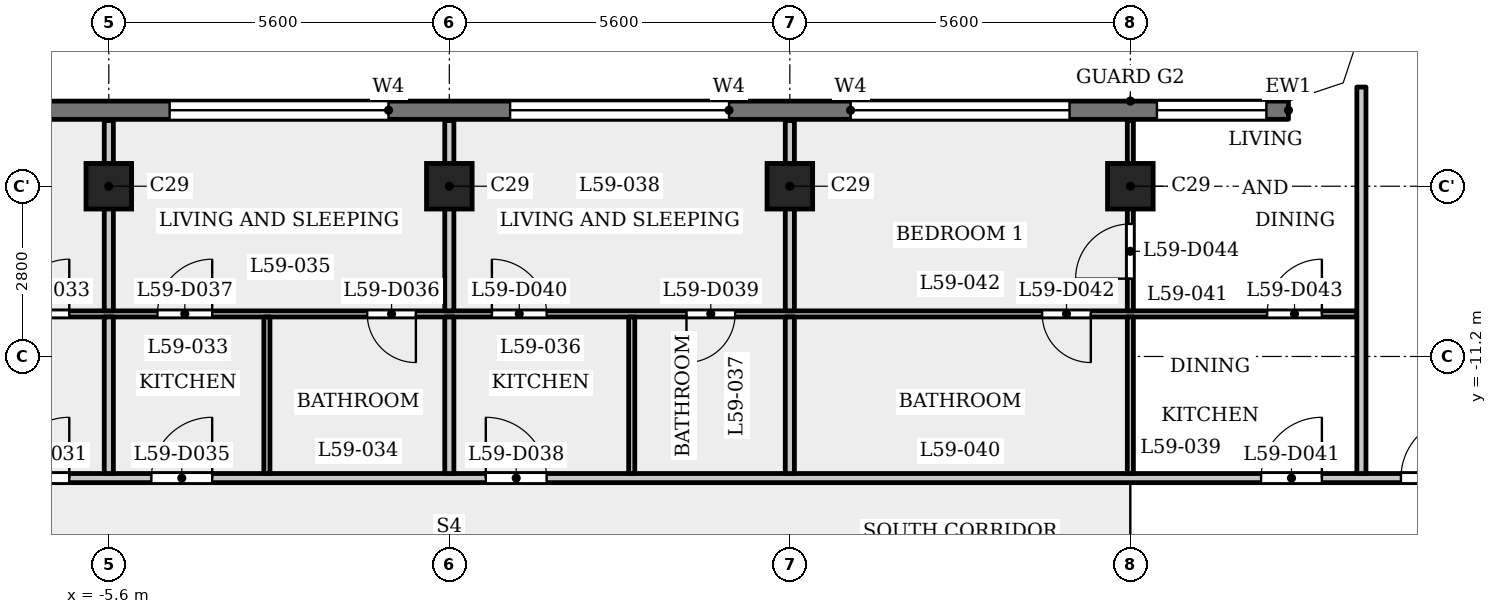
"""IFC4 building model, lengths in metres.
Left out: names, types, materials, properties, quantities, classifications, styles, units other than length and angle.
Written with IfcOpenShell. Run it as: python <this file> out.ifc"""

import sys

from ifc_helpers import new_model, si_unit, direction, frame, frame_2d, origin, origin_2d, place, context, subcontext, project, spatial, polyline, rectangle, outline, extrude, element, fill, save


model = new_model("IFC4")
c1 = context("Model", 3, precision=1e-05, world=origin(), true_north=direction((0.0, 1.0)))
c2 = subcontext(c1, "Body", "Model", "MODEL_VIEW")
j1 = project(units=[si_unit("LENGTHUNIT", "METRE"), si_unit("PLANEANGLEUNIT", "RADIAN")], contexts=[c1])
p1 = place(None, origin())
s1 = spatial("IfcSite", under=j1, at=p1, CompositionType="ELEMENT")
p2 = place(p1, origin())
s2 = spatial("IfcBuilding", under=s1, at=p2, CompositionType="ELEMENT")
p3 = place(p2, frame((0.0, 0.0, 227.4)))
s3 = spatial("IfcBuildingStorey", under=s2, at=p3, CompositionType="ELEMENT", Elevation=227.4)
for number, where, z_axis, x_axis in (
    (1, (-5.6, -8.4, 0.0), (0.0, 0.0, 1.0), (1.0, 0.0, 0.0)),
    (2, (0.0, -8.4, 0.0), (0.0, 0.0, 1.0), (1.0, 0.0, 0.0)),
    (3, (5.6, -8.4, 0.0), (0.0, 0.0, 1.0), (1.0, 0.0, 0.0)),
    (4, (11.2, -8.4, 0.0), (0.0, 0.0, 1.0), (1.0, 0.0, 0.0)),
):
    element("IfcColumn", number, at=place(p3, frame(where, z_axis=z_axis, x_axis=x_axis)), inside=s3, PredefinedType="COLUMN", context=c2, shape_type="SweptSolid", body=[
        extrude(rectangle(XDim=0.75, YDim=0.75, at=origin_2d()), origin(), (0.0, 0.0, 1.0), 3.5),
    ])
p4 = place(p3, frame((13.8, -7.15, 0.0), z_axis=(0.0, 0.0, 1.0), x_axis=(-1.0, 0.0, 0.0)))
e5 = element("IfcWall", 5, at=p4, inside=s3, PredefinedType="SOLIDWALL", context=c2, shape_type="SweptSolid", body=[
    extrude(rectangle(XDim=27.6, YDim=0.3, at=frame_2d((13.8, 0.0))), origin(), (0.0, 0.0, 1.0), 3.15),
])
p5 = place(p4, frame((0.363, 0.0, 0.9)))
e6 = element("IfcOpeningElement", 6, at=p5, cuts=e5, PredefinedType="OPENING", context=c2, shape_type="SweptSolid", body=[
    extrude(rectangle(XDim=1.8, YDim=1.25, at=frame_2d((0.9, 0.625))), frame((0.0, 0.16, 0.0), z_axis=(0.0, -1.0, 0.0), x_axis=(1.0, 0.0, 0.0)), (0.0, 0.0, 1.0), 0.32),
])
p6 = place(p4, frame((3.6, 0.0, 1.2)))
e7 = element("IfcOpeningElement", 7, at=p6, cuts=e5, PredefinedType="OPENING", context=c2, shape_type="SweptSolid", body=[
    extrude(rectangle(XDim=3.6, YDim=0.95, at=frame_2d((1.8, 0.475))), frame((0.0, 0.16, 0.0), z_axis=(0.0, -1.0, 0.0), x_axis=(1.0, 0.0, 0.0)), (0.0, 0.0, 1.0), 0.32),
])
p7 = place(p4, frame((9.2, 0.0, 1.2)))
e8 = element("IfcOpeningElement", 8, at=p7, cuts=e5, PredefinedType="OPENING", context=c2, shape_type="SweptSolid", body=[
    extrude(rectangle(XDim=3.6, YDim=0.95, at=frame_2d((1.8, 0.475))), frame((0.0, 0.16, 0.0), z_axis=(0.0, -1.0, 0.0), x_axis=(1.0, 0.0, 0.0)), (0.0, 0.0, 1.0), 0.32),
])
p8 = place(p4, frame((14.8, 0.0, 1.2)))
e9 = element("IfcOpeningElement", 9, at=p8, cuts=e5, PredefinedType="OPENING", context=c2, shape_type="SweptSolid", body=[
    extrude(rectangle(XDim=3.6, YDim=0.95, at=frame_2d((1.8, 0.475))), frame((0.0, 0.16, 0.0), z_axis=(0.0, -1.0, 0.0), x_axis=(1.0, 0.0, 0.0)), (0.0, 0.0, 1.0), 0.32),
])
p9 = place(p4, frame((20.4, 0.0, 1.2)))
e10 = element("IfcOpeningElement", 10, at=p9, cuts=e5, PredefinedType="OPENING", context=c2, shape_type="SweptSolid", body=[
    extrude(rectangle(XDim=3.6, YDim=0.95, at=frame_2d((1.8, 0.475))), frame((0.0, 0.16, 0.0), z_axis=(0.0, -1.0, 0.0), x_axis=(1.0, 0.0, 0.0)), (0.0, 0.0, 1.0), 0.32),
])
p10 = place(p4, frame((25.438, 0.0, 0.9)))
e11 = element("IfcOpeningElement", 11, at=p10, cuts=e5, PredefinedType="OPENING", context=c2, shape_type="SweptSolid", body=[
    extrude(rectangle(XDim=1.8, YDim=1.25, at=frame_2d((0.9, 0.625))), frame((0.0, 0.16, 0.0), z_axis=(0.0, -1.0, 0.0), x_axis=(1.0, 0.0, 0.0)), (0.0, 0.0, 1.0), 0.32),
])
p11 = place(p3, frame((-17.4, -13.2, 0.0), z_axis=(0.0, 0.0, 1.0), x_axis=(1.0, 0.0, 0.0)))
e12 = element("IfcWall", 12, at=p11, inside=s3, PredefinedType="PARTITIONING", context=c2, shape_type="SweptSolid", body=[
    extrude(rectangle(XDim=34.8, YDim=0.15, at=frame_2d((17.4, 0.0))), origin(), (0.0, 0.0, 1.0), 3.15),
])
p12 = place(p11, frame((0.65, 0.0, 0.0)))
e13 = element("IfcOpeningElement", 13, at=p12, cuts=e12, PredefinedType="OPENING", context=c2, shape_type="SweptSolid", body=[
    extrude(rectangle(XDim=1.0, YDim=2.1, at=frame_2d((0.5, 1.05))), frame((0.0, 0.085, 0.0), z_axis=(0.0, -1.0, 0.0), x_axis=(1.0, 0.0, 0.0)), (0.0, 0.0, 1.0), 0.17),
])
p13 = place(p11, frame((33.05, 0.0, 0.0)))
e14 = element("IfcOpeningElement", 14, at=p13, cuts=e12, PredefinedType="OPENING", context=c2, shape_type="SweptSolid", body=[
    extrude(rectangle(XDim=1.0, YDim=2.1, at=frame_2d((0.5, 1.05))), frame((0.0, 0.085, 0.0), z_axis=(0.0, -1.0, 0.0), x_axis=(1.0, 0.0, 0.0)), (0.0, 0.0, 1.0), 0.17),
])
p14 = place(p11, frame((10.15, 0.0, 0.0)))
e15 = element("IfcOpeningElement", 15, at=p14, cuts=e12, PredefinedType="OPENING", context=c2, shape_type="SweptSolid", body=[
    extrude(rectangle(XDim=1.0, YDim=2.1, at=frame_2d((0.5, 1.05))), frame((0.0, 0.085, 0.0), z_axis=(0.0, -1.0, 0.0), x_axis=(1.0, 0.0, 0.0)), (0.0, 0.0, 1.0), 0.17),
])
p15 = place(p11, frame((12.5, 0.0, 0.0)))
e16 = element("IfcOpeningElement", 16, at=p15, cuts=e12, PredefinedType="OPENING", context=c2, shape_type="SweptSolid", body=[
    extrude(rectangle(XDim=1.0, YDim=2.1, at=frame_2d((0.5, 1.05))), frame((0.0, 0.085, 0.0), z_axis=(0.0, -1.0, 0.0), x_axis=(1.0, 0.0, 0.0)), (0.0, 0.0, 1.0), 0.17),
])
p16 = place(p11, frame((18.0, 0.0, 0.0)))
e17 = element("IfcOpeningElement", 17, at=p16, cuts=e12, PredefinedType="OPENING", context=c2, shape_type="SweptSolid", body=[
    extrude(rectangle(XDim=1.0, YDim=2.1, at=frame_2d((0.5, 1.05))), frame((0.0, 0.085, 0.0), z_axis=(0.0, -1.0, 0.0), x_axis=(1.0, 0.0, 0.0)), (0.0, 0.0, 1.0), 0.17),
])
p17 = place(p11, frame((30.75, 0.0, 0.0)))
e18 = element("IfcOpeningElement", 18, at=p17, cuts=e12, PredefinedType="OPENING", context=c2, shape_type="SweptSolid", body=[
    extrude(rectangle(XDim=1.0, YDim=2.1, at=frame_2d((0.5, 1.05))), frame((0.0, 0.085, 0.0), z_axis=(0.0, -1.0, 0.0), x_axis=(1.0, 0.0, 0.0)), (0.0, 0.0, 1.0), 0.17),
])
p18 = place(p3, frame((-14.925, -10.5, 0.0), z_axis=(0.0, 0.0, 1.0), x_axis=(1.0, 0.0, 0.0)))
e19 = element("IfcWall", 19, at=p18, inside=s3, PredefinedType="PARTITIONING", context=c2, shape_type="SweptSolid", body=[
    extrude(rectangle(XDim=29.85, YDim=0.1, at=frame_2d((14.925, 0.0))), origin(), (0.0, 0.0, 1.0), 3.15),
])
p19 = place(p18, frame((2.325, 0.0, 0.0)))
e20 = element("IfcOpeningElement", 20, at=p19, cuts=e19, PredefinedType="OPENING", context=c2, shape_type="SweptSolid", body=[
    extrude(rectangle(XDim=0.8, YDim=2.1, at=frame_2d((0.4, 1.05))), frame((0.0, 0.06, 0.0), z_axis=(0.0, -1.0, 0.0), x_axis=(1.0, 0.0, 0.0)), (0.0, 0.0, 1.0), 0.12),
])
p20 = place(p18, frame((7.775, 0.0, 0.0)))
e21 = element("IfcOpeningElement", 21, at=p20, cuts=e19, PredefinedType="OPENING", context=c2, shape_type="SweptSolid", body=[
    extrude(rectangle(XDim=0.9, YDim=2.1, at=frame_2d((0.45, 1.05))), frame((0.0, 0.06, 0.0), z_axis=(0.0, -1.0, 0.0), x_axis=(1.0, 0.0, 0.0)), (0.0, 0.0, 1.0), 0.12),
])
p21 = place(p18, frame((13.575, 0.0, 0.0)))
e22 = element("IfcOpeningElement", 22, at=p21, cuts=e19, PredefinedType="OPENING", context=c2, shape_type="SweptSolid", body=[
    extrude(rectangle(XDim=0.8, YDim=2.1, at=frame_2d((0.4, 1.05))), frame((0.0, 0.06, 0.0), z_axis=(0.0, -1.0, 0.0), x_axis=(1.0, 0.0, 0.0)), (0.0, 0.0, 1.0), 0.12),
])
p22 = place(p18, frame((10.125, 0.0, 0.0)))
e23 = element("IfcOpeningElement", 23, at=p22, cuts=e19, PredefinedType="OPENING", context=c2, shape_type="SweptSolid", body=[
    extrude(rectangle(XDim=0.9, YDim=2.1, at=frame_2d((0.45, 1.05))), frame((0.0, 0.06, 0.0), z_axis=(0.0, -1.0, 0.0), x_axis=(1.0, 0.0, 0.0)), (0.0, 0.0, 1.0), 0.12),
])
p23 = place(p18, frame((18.825, 0.0, 0.0)))
e24 = element("IfcOpeningElement", 24, at=p23, cuts=e19, PredefinedType="OPENING", context=c2, shape_type="SweptSolid", body=[
    extrude(rectangle(XDim=0.8, YDim=2.1, at=frame_2d((0.4, 1.05))), frame((0.0, 0.06, 0.0), z_axis=(0.0, -1.0, 0.0), x_axis=(1.0, 0.0, 0.0)), (0.0, 0.0, 1.0), 0.12),
])
p24 = place(p18, frame((15.625, 0.0, 0.0)))
e25 = element("IfcOpeningElement", 25, at=p24, cuts=e19, PredefinedType="OPENING", context=c2, shape_type="SweptSolid", body=[
    extrude(rectangle(XDim=0.9, YDim=2.1, at=frame_2d((0.45, 1.05))), frame((0.0, 0.06, 0.0), z_axis=(0.0, -1.0, 0.0), x_axis=(1.0, 0.0, 0.0)), (0.0, 0.0, 1.0), 0.12),
])
p25 = place(p18, frame((24.675, 0.0, 0.0)))
e26 = element("IfcOpeningElement", 26, at=p25, cuts=e19, PredefinedType="OPENING", context=c2, shape_type="SweptSolid", body=[
    extrude(rectangle(XDim=0.8, YDim=2.1, at=frame_2d((0.4, 1.05))), frame((0.0, 0.06, 0.0), z_axis=(0.0, -1.0, 0.0), x_axis=(1.0, 0.0, 0.0)), (0.0, 0.0, 1.0), 0.12),
])
p26 = place(p18, frame((28.375, 0.0, 0.0)))
e27 = element("IfcOpeningElement", 27, at=p26, cuts=e19, PredefinedType="OPENING", context=c2, shape_type="SweptSolid", body=[
    extrude(rectangle(XDim=0.9, YDim=2.1, at=frame_2d((0.45, 1.05))), frame((0.0, 0.06, 0.0), z_axis=(0.0, -1.0, 0.0), x_axis=(1.0, 0.0, 0.0)), (0.0, 0.0, 1.0), 0.12),
])
p27 = place(p3, frame((-5.6, -13.125, 0.0), z_axis=(0.0, 0.0, 1.0), x_axis=(0.0, 1.0, 0.0)))
e28 = element("IfcWall", 28, at=p27, inside=s3, PredefinedType="PARTITIONING", context=c2, shape_type="SweptSolid", body=[
    extrude(rectangle(XDim=2.575, YDim=0.15, at=frame_2d((1.288, 0.0))), origin(), (0.0, 0.0, 1.0), 3.15),
])
p28 = place(p3, frame((-5.6, -10.45, 0.0), z_axis=(0.0, 0.0, 1.0), x_axis=(0.0, 1.0, 0.0)))
e29 = element("IfcWall", 29, at=p28, inside=s3, PredefinedType="PARTITIONING", context=c2, shape_type="SweptSolid", body=[
    extrude(rectangle(XDim=3.13, YDim=0.15, at=frame_2d((1.565, 0.0))), origin(), (0.0, 0.0, 1.0), 3.15),
])
p29 = place(p3, frame((-3.0, -13.125, 0.0), z_axis=(0.0, 0.0, 1.0), x_axis=(0.0, 1.0, 0.0)))
e30 = element("IfcWall", 30, at=p29, inside=s3, PredefinedType="PARTITIONING", context=c2, shape_type="SweptSolid", body=[
    extrude(rectangle(XDim=2.575, YDim=0.1, at=frame_2d((1.288, 0.0))), origin(), (0.0, 0.0, 1.0), 3.15),
])
p30 = place(p3, frame((0.0, -13.125, 0.0), z_axis=(0.0, 0.0, 1.0), x_axis=(0.0, 1.0, 0.0)))
e31 = element("IfcWall", 31, at=p30, inside=s3, PredefinedType="PARTITIONING", context=c2, shape_type="SweptSolid", body=[
    extrude(rectangle(XDim=2.575, YDim=0.15, at=frame_2d((1.288, 0.0))), origin(), (0.0, 0.0, 1.0), 3.15),
])
p31 = place(p3, frame((0.0, -10.45, 0.0), z_axis=(0.0, 0.0, 1.0), x_axis=(0.0, 1.0, 0.0)))
e32 = element("IfcWall", 32, at=p31, inside=s3, PredefinedType="PARTITIONING", context=c2, shape_type="SweptSolid", body=[
    extrude(rectangle(XDim=3.13, YDim=0.15, at=frame_2d((1.565, 0.0))), origin(), (0.0, 0.0, 1.0), 3.15),
])
p32 = place(p3, frame((3.0, -13.125, 0.0), z_axis=(0.0, 0.0, 1.0), x_axis=(0.0, 1.0, 0.0)))
e33 = element("IfcWall", 33, at=p32, inside=s3, PredefinedType="PARTITIONING", context=c2, shape_type="SweptSolid", body=[
    extrude(rectangle(XDim=2.575, YDim=0.1, at=frame_2d((1.288, 0.0))), origin(), (0.0, 0.0, 1.0), 3.15),
])
p33 = place(p3, frame((5.6, -13.125, 0.0), z_axis=(0.0, 0.0, 1.0), x_axis=(0.0, 1.0, 0.0)))
e34 = element("IfcWall", 34, at=p33, inside=s3, PredefinedType="PARTITIONING", context=c2, shape_type="SweptSolid", body=[
    extrude(rectangle(XDim=2.575, YDim=0.15, at=frame_2d((1.288, 0.0))), origin(), (0.0, 0.0, 1.0), 3.15),
])
p34 = place(p3, frame((5.6, -10.45, 0.0), z_axis=(0.0, 0.0, 1.0), x_axis=(0.0, 1.0, 0.0)))
e35 = element("IfcWall", 35, at=p34, inside=s3, PredefinedType="PARTITIONING", context=c2, shape_type="SweptSolid", body=[
    extrude(rectangle(XDim=3.13, YDim=0.15, at=frame_2d((1.565, 0.0))), origin(), (0.0, 0.0, 1.0), 3.15),
])
p35 = place(p3, frame((11.2, -13.125, 0.0), z_axis=(0.0, 0.0, 1.0), x_axis=(0.0, 1.0, 0.0)))
e36 = element("IfcWall", 36, at=p35, inside=s3, PredefinedType="PARTITIONING", context=c2, shape_type="SweptSolid", body=[
    extrude(rectangle(XDim=2.575, YDim=0.1, at=frame_2d((1.288, 0.0))), origin(), (0.0, 0.0, 1.0), 3.15),
])
p36 = place(p3, frame((11.2, -10.45, 0.0), z_axis=(0.0, 0.0, 1.0), x_axis=(0.0, 1.0, 0.0)))
e37 = element("IfcWall", 37, at=p36, inside=s3, PredefinedType="PARTITIONING", context=c2, shape_type="SweptSolid", body=[
    extrude(rectangle(XDim=3.13, YDim=0.1, at=frame_2d((1.565, 0.0))), origin(), (0.0, 0.0, 1.0), 3.15),
])
p37 = place(p36, frame((0.53, 0.0, 0.0)))
e38 = element("IfcOpeningElement", 38, at=p37, cuts=e37, PredefinedType="OPENING", context=c2, shape_type="SweptSolid", body=[
    extrude(rectangle(XDim=0.9, YDim=2.1, at=frame_2d((0.45, 1.05))), frame((0.0, 0.06, 0.0), z_axis=(0.0, -1.0, 0.0), x_axis=(1.0, 0.0, 0.0)), (0.0, 0.0, 1.0), 0.12),
])
p38 = place(p3, frame((15.0, -13.125, 0.0), z_axis=(0.0, 0.0, 1.0), x_axis=(0.0, 1.0, 0.0)))
e39 = element("IfcWall", 39, at=p38, inside=s3, PredefinedType="PARTITIONING", context=c2, shape_type="SweptSolid", body=[
    extrude(rectangle(XDim=6.356, YDim=0.15, at=frame_2d((3.178, 0.0))), origin(), (0.0, 0.0, 1.0), 3.15),
])
p39 = place(p3, origin())
e40 = element("IfcWall", 40, at=p39, inside=s3, PredefinedType="SOLIDWALL", context=c2, shape_type="SweptSolid", body=[
    extrude(outline(polyline([(14.937, -6.937), (15.3, -5.849), (15.3, -5.8), (15.0, -5.8), (14.7, -6.7), (13.8, -7.0), (13.8, -7.3), (13.849, -7.3), (14.937, -6.937)])), origin(), (0.0, 0.0, 1.0), 3.15),
])
p40 = place(p13, origin())
e41 = element("IfcDoor", 41, at=p40, inside=s3, OperationType="SINGLE_SWING_LEFT", PredefinedType="DOOR", context=c2, shape_type="SweptSolid", body=[
    extrude(rectangle(XDim=1.0, YDim=2.1, at=frame_2d((0.5, 1.05))), frame((0.0, 0.025, 0.0), z_axis=(0.0, -1.0, 0.0), x_axis=(1.0, 0.0, 0.0)), (0.0, 0.0, 1.0), 0.05),
])
fill(e14, e41)
p41 = place(p14, origin())
e42 = element("IfcDoor", 42, at=p41, inside=s3, OperationType="SINGLE_SWING_LEFT", PredefinedType="DOOR", context=c2, shape_type="SweptSolid", body=[
    extrude(rectangle(XDim=1.0, YDim=2.1, at=frame_2d((0.5, 1.05))), frame((0.0, 0.025, 0.0), z_axis=(0.0, -1.0, 0.0), x_axis=(1.0, 0.0, 0.0)), (0.0, 0.0, 1.0), 0.05),
])
fill(e15, e42)
p42 = place(p20, origin())
e43 = element("IfcDoor", 43, at=p42, inside=s3, OperationType="SINGLE_SWING_LEFT", PredefinedType="DOOR", context=c2, shape_type="SweptSolid", body=[
    extrude(rectangle(XDim=0.9, YDim=2.1, at=frame_2d((0.45, 1.05))), frame((0.0, 0.025, 0.0), z_axis=(0.0, -1.0, 0.0), x_axis=(1.0, 0.0, 0.0)), (0.0, 0.0, 1.0), 0.05),
])
fill(e21, e43)
p43 = place(p15, origin())
e44 = element("IfcDoor", 44, at=p43, inside=s3, OperationType="SINGLE_SWING_LEFT", PredefinedType="DOOR", context=c2, shape_type="SweptSolid", body=[
    extrude(rectangle(XDim=1.0, YDim=2.1, at=frame_2d((0.5, 1.05))), frame((0.0, 0.025, 0.0), z_axis=(0.0, -1.0, 0.0), x_axis=(1.0, 0.0, 0.0)), (0.0, 0.0, 1.0), 0.05),
])
fill(e16, e44)
p44 = place(p21, origin())
e45 = element("IfcDoor", 45, at=p44, inside=s3, OperationType="SINGLE_SWING_RIGHT", PredefinedType="DOOR", context=c2, shape_type="SweptSolid", body=[
    extrude(rectangle(XDim=0.8, YDim=2.1, at=frame_2d((0.4, 1.05))), frame((0.0, 0.025, 0.0), z_axis=(0.0, -1.0, 0.0), x_axis=(1.0, 0.0, 0.0)), (0.0, 0.0, 1.0), 0.05),
])
fill(e22, e45)
p45 = place(p22, origin())
e46 = element("IfcDoor", 46, at=p45, inside=s3, OperationType="SINGLE_SWING_LEFT", PredefinedType="DOOR", context=c2, shape_type="SweptSolid", body=[
    extrude(rectangle(XDim=0.9, YDim=2.1, at=frame_2d((0.45, 1.05))), frame((0.0, 0.025, 0.0), z_axis=(0.0, -1.0, 0.0), x_axis=(1.0, 0.0, 0.0)), (0.0, 0.0, 1.0), 0.05),
])
fill(e23, e46)
p46 = place(p16, origin())
e47 = element("IfcDoor", 47, at=p46, inside=s3, OperationType="SINGLE_SWING_RIGHT", PredefinedType="DOOR", context=c2, shape_type="SweptSolid", body=[
    extrude(rectangle(XDim=1.0, YDim=2.1, at=frame_2d((0.5, 1.05))), frame((0.0, 0.025, 0.0), z_axis=(0.0, -1.0, 0.0), x_axis=(1.0, 0.0, 0.0)), (0.0, 0.0, 1.0), 0.05),
])
fill(e17, e47)
p47 = place(p23, origin())
e48 = element("IfcDoor", 48, at=p47, inside=s3, OperationType="SINGLE_SWING_LEFT", PredefinedType="DOOR", context=c2, shape_type="SweptSolid", body=[
    extrude(rectangle(XDim=0.8, YDim=2.1, at=frame_2d((0.4, 1.05))), frame((0.0, 0.025, 0.0), z_axis=(0.0, -1.0, 0.0), x_axis=(1.0, 0.0, 0.0)), (0.0, 0.0, 1.0), 0.05),
])
fill(e24, e48)
p48 = place(p24, origin())
e49 = element("IfcDoor", 49, at=p48, inside=s3, OperationType="SINGLE_SWING_RIGHT", PredefinedType="DOOR", context=c2, shape_type="SweptSolid", body=[
    extrude(rectangle(XDim=0.9, YDim=2.1, at=frame_2d((0.45, 1.05))), frame((0.0, 0.025, 0.0), z_axis=(0.0, -1.0, 0.0), x_axis=(1.0, 0.0, 0.0)), (0.0, 0.0, 1.0), 0.05),
])
fill(e25, e49)
p49 = place(p17, origin())
e50 = element("IfcDoor", 50, at=p49, inside=s3, OperationType="SINGLE_SWING_LEFT", PredefinedType="DOOR", context=c2, shape_type="SweptSolid", body=[
    extrude(rectangle(XDim=1.0, YDim=2.1, at=frame_2d((0.5, 1.05))), frame((0.0, 0.025, 0.0), z_axis=(0.0, -1.0, 0.0), x_axis=(1.0, 0.0, 0.0)), (0.0, 0.0, 1.0), 0.05),
])
fill(e18, e50)
p50 = place(p25, origin())
e51 = element("IfcDoor", 51, at=p50, inside=s3, OperationType="SINGLE_SWING_RIGHT", PredefinedType="DOOR", context=c2, shape_type="SweptSolid", body=[
    extrude(rectangle(XDim=0.8, YDim=2.1, at=frame_2d((0.4, 1.05))), frame((0.0, 0.025, 0.0), z_axis=(0.0, -1.0, 0.0), x_axis=(1.0, 0.0, 0.0)), (0.0, 0.0, 1.0), 0.05),
])
fill(e26, e51)
p51 = place(p26, origin())
e52 = element("IfcDoor", 52, at=p51, inside=s3, OperationType="SINGLE_SWING_LEFT", PredefinedType="DOOR", context=c2, shape_type="SweptSolid", body=[
    extrude(rectangle(XDim=0.9, YDim=2.1, at=frame_2d((0.45, 1.05))), frame((0.0, 0.025, 0.0), z_axis=(0.0, -1.0, 0.0), x_axis=(1.0, 0.0, 0.0)), (0.0, 0.0, 1.0), 0.05),
])
fill(e27, e52)
p52 = place(p37, origin())
e53 = element("IfcDoor", 53, at=p52, inside=s3, OperationType="SINGLE_SWING_RIGHT", PredefinedType="DOOR", context=c2, shape_type="SweptSolid", body=[
    extrude(rectangle(XDim=0.9, YDim=2.1, at=frame_2d((0.45, 1.05))), frame((0.0, 0.025, 0.0), z_axis=(0.0, -1.0, 0.0), x_axis=(1.0, 0.0, 0.0)), (0.0, 0.0, 1.0), 0.05),
])
fill(e38, e53)
p53 = place(p5, origin())
e54 = element("IfcWindow", 54, at=p53, inside=s3, PartitioningType="SINGLE_PANEL", PredefinedType="WINDOW", context=c2, shape_type="SweptSolid", body=[
    extrude(rectangle(XDim=1.8, YDim=1.25, at=frame_2d((0.9, 0.625))), frame((0.0, 0.03, 0.0), z_axis=(0.0, -1.0, 0.0), x_axis=(1.0, 0.0, 0.0)), (0.0, 0.0, 1.0), 0.06),
])
fill(e6, e54)
p54 = place(p6, origin())
e55 = element("IfcWindow", 55, at=p54, inside=s3, PartitioningType="SINGLE_PANEL", PredefinedType="WINDOW", context=c2, shape_type="SweptSolid", body=[
    extrude(rectangle(XDim=3.6, YDim=0.95, at=frame_2d((1.8, 0.475))), frame((0.0, 0.03, 0.0), z_axis=(0.0, -1.0, 0.0), x_axis=(1.0, 0.0, 0.0)), (0.0, 0.0, 1.0), 0.06),
])
fill(e7, e55)
p55 = place(p7, origin())
e56 = element("IfcWindow", 56, at=p55, inside=s3, PartitioningType="SINGLE_PANEL", PredefinedType="WINDOW", context=c2, shape_type="SweptSolid", body=[
    extrude(rectangle(XDim=3.6, YDim=0.95, at=frame_2d((1.8, 0.475))), frame((0.0, 0.03, 0.0), z_axis=(0.0, -1.0, 0.0), x_axis=(1.0, 0.0, 0.0)), (0.0, 0.0, 1.0), 0.06),
])
fill(e8, e56)
p56 = place(p8, origin())
e57 = element("IfcWindow", 57, at=p56, inside=s3, PartitioningType="SINGLE_PANEL", PredefinedType="WINDOW", context=c2, shape_type="SweptSolid", body=[
    extrude(rectangle(XDim=3.6, YDim=0.95, at=frame_2d((1.8, 0.475))), frame((0.0, 0.03, 0.0), z_axis=(0.0, -1.0, 0.0), x_axis=(1.0, 0.0, 0.0)), (0.0, 0.0, 1.0), 0.06),
])
fill(e9, e57)
save(model, sys.argv[1])
